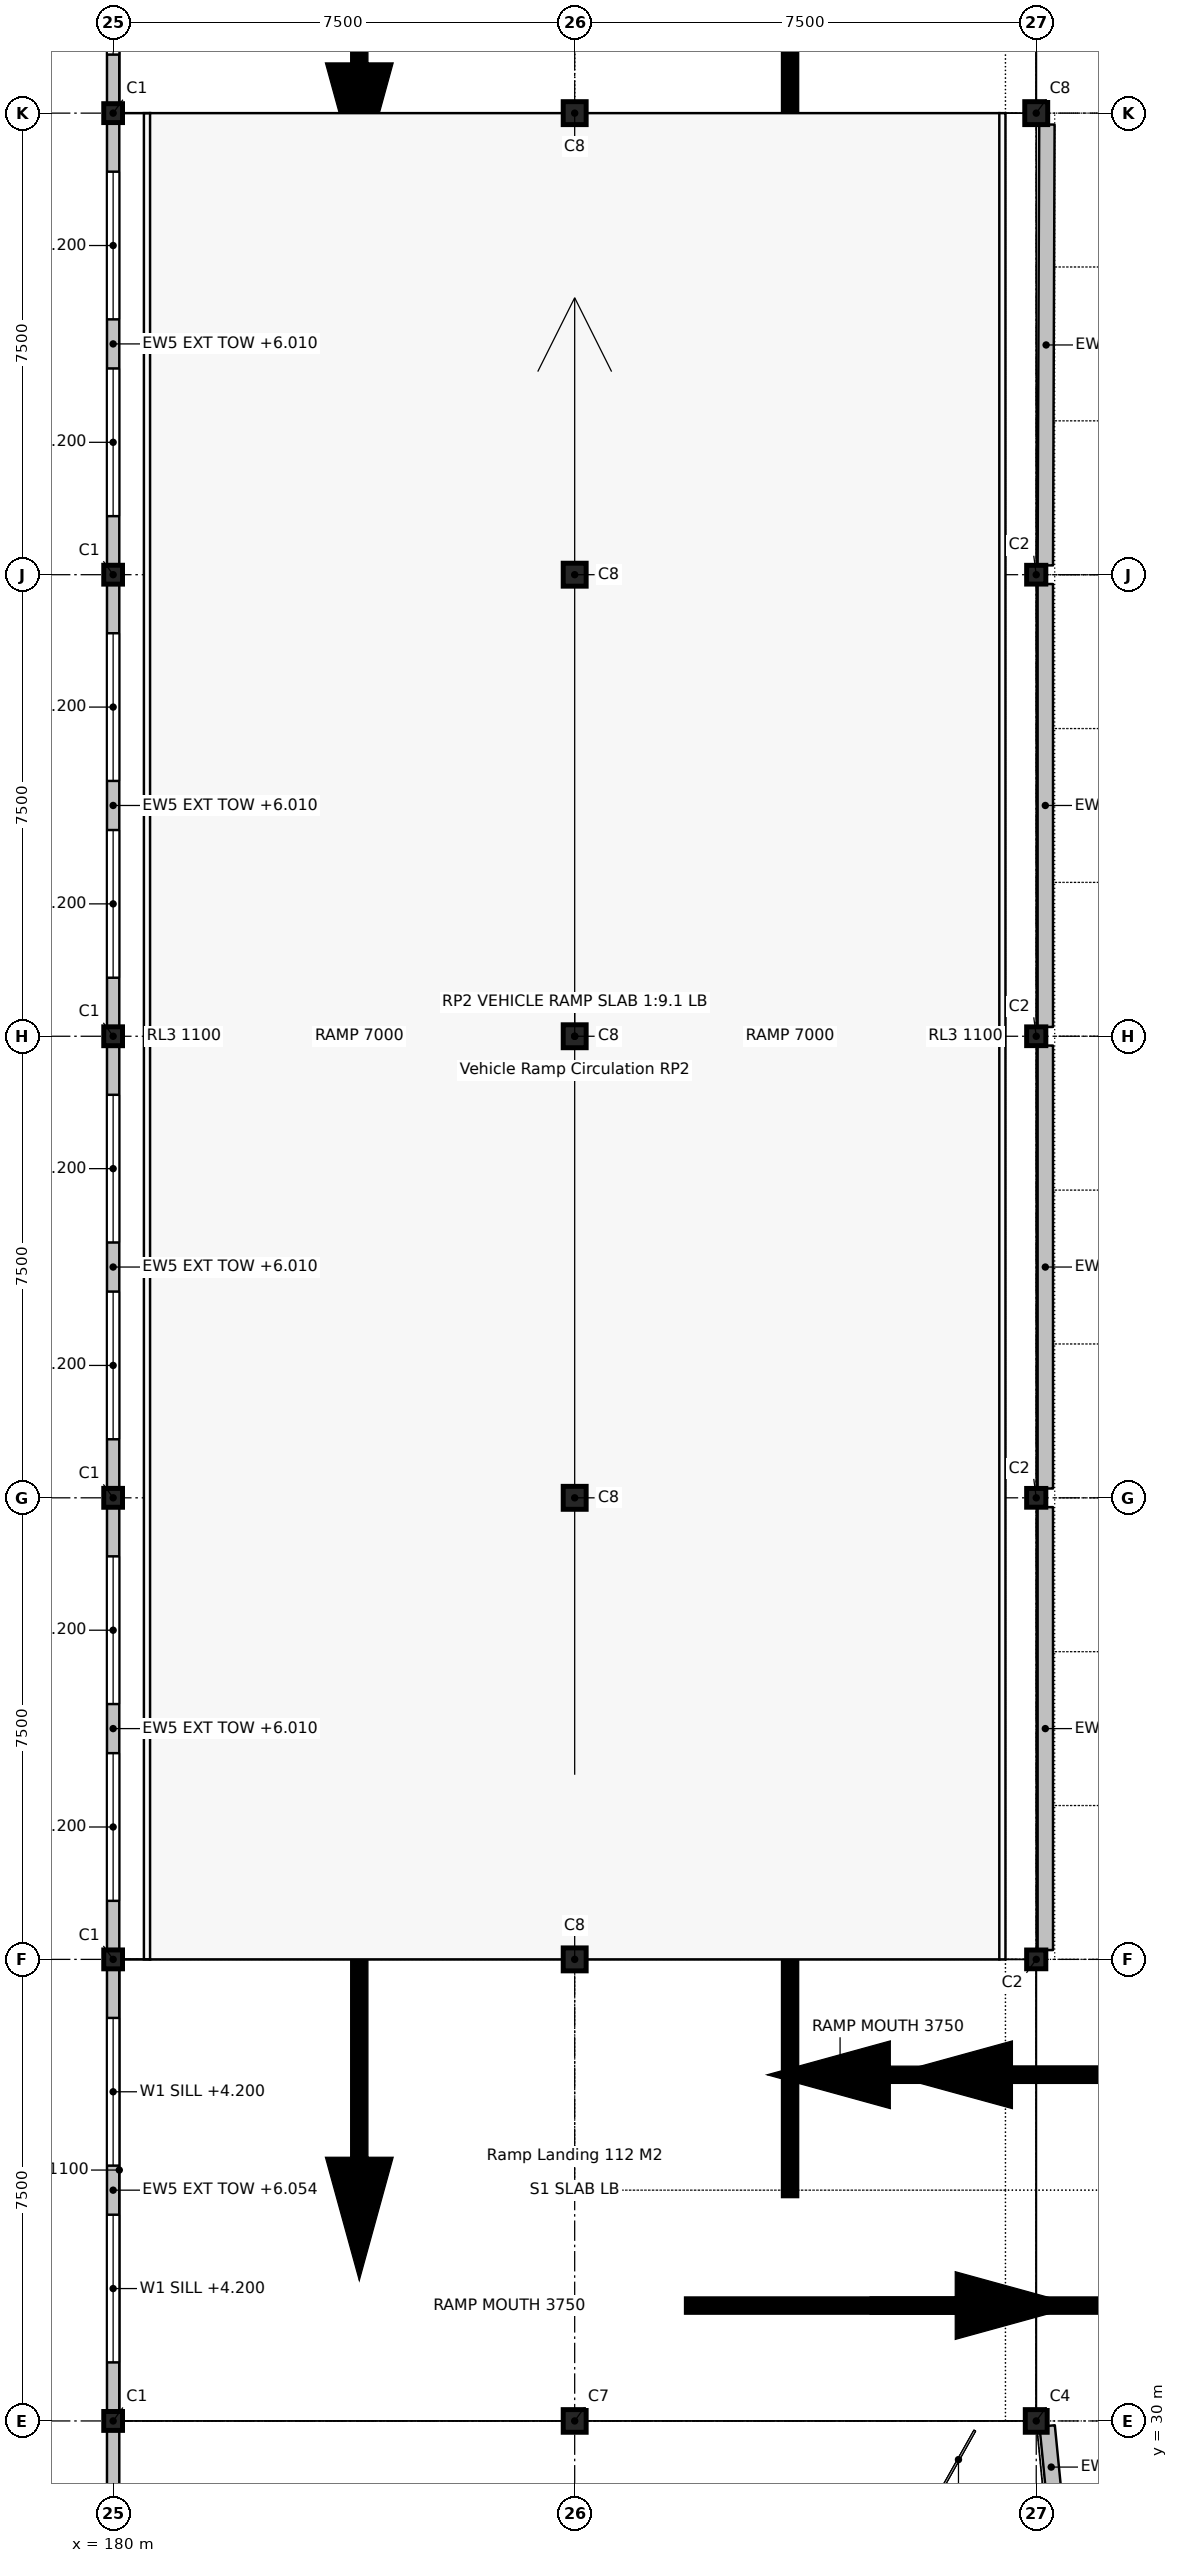
"""IFC4 building model, lengths in metres.
Left out: names, types, materials, properties, quantities, classifications, styles, units other than length and angle.
Written with IfcOpenShell. Run it as: python <this file> out.ifc"""

import sys

from ifc_helpers import new_model, si_unit, direction, frame, frame_2d, origin, origin_2d, place, context, subcontext, project, spatial, rectangle, i_section, extrude, element, fill, save


model = new_model("IFC4")
c1 = context("Model", 3, precision=1e-05, world=origin(), true_north=direction((0.0, 1.0)))
c2 = subcontext(c1, "Body", "Model", "MODEL_VIEW")
j1 = project(units=[si_unit("LENGTHUNIT", "METRE"), si_unit("PLANEANGLEUNIT", "RADIAN")], contexts=[c1])
p1 = place(None, origin())
s1 = spatial("IfcSite", under=j1, at=p1, CompositionType="ELEMENT")
p2 = place(p1, origin())
s2 = spatial("IfcBuilding", under=s1, at=p2, CompositionType="ELEMENT")
p3 = place(p2, frame((0.0, 0.0, 3.3)))
s3 = spatial("IfcBuildingStorey", under=s2, at=p3, CompositionType="ELEMENT", Elevation=3.3)
for number, where, z_axis, x_axis in (
    (1, (180.0, 30.0, 0.0), (0.0, 0.0, 1.0), (1.0, 0.0, 0.0)),
    (2, (180.0, 37.5, 0.0), (0.0, 0.0, 1.0), (1.0, 0.0, 0.0)),
    (3, (180.0, 45.0, 0.0), (0.0, 0.0, 1.0), (1.0, 0.0, 0.0)),
    (4, (180.0, 52.5, 0.0), (0.0, 0.0, 1.0), (1.0, 0.0, 0.0)),
    (5, (180.0, 60.0, 0.0), (0.0, 0.0, 1.0), (1.0, 0.0, 0.0)),
    (6, (180.0, 67.5, 0.0), (0.0, 0.0, 1.0), (1.0, 0.0, 0.0)),
):
    element("IfcColumn", number, at=place(p3, frame(where, z_axis=z_axis, x_axis=x_axis)), inside=s3, PredefinedType="COLUMN", context=c2, shape_type="SweptSolid", body=[
        extrude(i_section(OverallWidth=0.305, OverallDepth=0.307, WebThickness=0.01, FlangeThickness=0.015, FilletRadius=0.015, at=origin_2d()), origin(), (0.0, 0.0, 1.0), 3.3),
    ])
p4 = place(p3, frame((187.5, 30.0, 0.0), z_axis=(0.0, 0.0, 1.0), x_axis=(1.0, 0.0, 0.0)))
e7 = element("IfcColumn", 7, at=p4, inside=s3, PredefinedType="COLUMN", context=c2, shape_type="SweptSolid", body=[
    extrude(i_section(OverallWidth=0.373, OverallDepth=0.368, WebThickness=0.015, FlangeThickness=0.024, FilletRadius=0.015, at=origin_2d()), origin(), (0.0, 0.0, 1.0), 3.3),
])
for number, where, z_axis, x_axis in (
    (8, (187.5, 37.5, 0.0), (0.0, 0.0, 1.0), (1.0, 0.0, 0.0)),
    (9, (187.5, 45.0, 0.0), (0.0, 0.0, 1.0), (1.0, 0.0, 0.0)),
    (10, (187.5, 52.5, 0.0), (0.0, 0.0, 1.0), (1.0, 0.0, 0.0)),
    (11, (187.5, 60.0, 0.0), (0.0, 0.0, 1.0), (1.0, 0.0, 0.0)),
    (12, (187.5, 67.5, 0.0), (0.0, 0.0, 1.0), (1.0, 0.0, 0.0)),
    (13, (195.0, 67.5, 0.0), (0.0, 0.0, 1.0), (0.0, 1.0, 0.0)),
):
    element("IfcColumn", number, at=place(p3, frame(where, z_axis=z_axis, x_axis=x_axis)), inside=s3, PredefinedType="COLUMN", context=c2, shape_type="SweptSolid", body=[
        extrude(i_section(OverallWidth=0.373, OverallDepth=0.373, WebThickness=0.016, FlangeThickness=0.026, FilletRadius=0.015, at=origin_2d()), origin(), (0.0, 0.0, 1.0), 3.3),
    ])
for number, where, z_axis, x_axis in (
    (14, (195.0, 60.0, 0.0), (0.0, 0.0, 1.0), (0.0, 1.0, 0.0)),
    (15, (195.0, 52.5, 0.0), (0.0, 0.0, 1.0), (0.0, 1.0, 0.0)),
    (16, (195.0, 45.0, 0.0), (0.0, 0.0, 1.0), (0.0, 1.0, 0.0)),
    (17, (195.0, 37.5, 0.0), (0.0, 0.0, 1.0), (0.0, 1.0, 0.0)),
):
    element("IfcColumn", number, at=place(p3, frame(where, z_axis=z_axis, x_axis=x_axis)), inside=s3, PredefinedType="COLUMN", context=c2, shape_type="SweptSolid", body=[
        extrude(i_section(OverallWidth=0.305, OverallDepth=0.312, WebThickness=0.011, FlangeThickness=0.017, FilletRadius=0.015, at=origin_2d()), origin(), (0.0, 0.0, 1.0), 3.3),
    ])
p5 = place(p3, frame((195.0, 30.0, 0.0), z_axis=(0.0, 0.0, 1.0), x_axis=(0.0, 1.0, 0.0)))
e18 = element("IfcColumn", 18, at=p5, inside=s3, PredefinedType="COLUMN", context=c2, shape_type="SweptSolid", body=[
    extrude(i_section(OverallWidth=0.368, OverallDepth=0.356, WebThickness=0.011, FlangeThickness=0.018, FilletRadius=0.015, at=origin_2d()), origin(), (0.0, 0.0, 1.0), 3.3),
])
p6 = place(p3, frame((195.173, 67.314, 0.0), z_axis=(0.0, 0.0, 1.0), x_axis=(-0.003612914829, -0.999993473402, 0.0)))
e19 = element("IfcWall", 19, at=p6, inside=s3, PredefinedType="SOLIDWALL", context=c2, shape_type="SweptSolid", body=[
    extrude(rectangle(XDim=7.163, YDim=0.25, at=frame_2d((3.582, 0.0))), origin(), (0.0, 0.0, 1.0), 1.1),
])
for number, where, z_axis, x_axis in (
    (20, (195.147, 59.848, 0.0), (0.0, 0.0, 1.0), (0.0, -1.0, 0.0)),
    (21, (195.147, 52.348, 0.0), (0.0, 0.0, 1.0), (0.0, -1.0, 0.0)),
    (22, (195.147, 44.848, 0.0), (0.0, 0.0, 1.0), (0.0, -1.0, 0.0)),
):
    element("IfcWall", number, at=place(p3, frame(where, z_axis=z_axis, x_axis=x_axis)), inside=s3, PredefinedType="SOLIDWALL", context=c2, shape_type="SweptSolid", body=[
        extrude(rectangle(XDim=7.197, YDim=0.25, at=frame_2d((3.598, 0.0))), origin(), (0.0, 0.0, 1.0), 1.1),
    ])
p7 = place(p3, frame((195.178, 29.918, 0.0), z_axis=(0.0, 0.0, 1.0), x_axis=(0.097900088064, -0.995196248364, 0.0)))
e23 = element("IfcWall", 23, at=p7, inside=s3, PredefinedType="SOLIDWALL", context=c2, shape_type="SweptSolid", body=[
    extrude(rectangle(XDim=1.342, YDim=0.25, at=frame_2d((0.671, 0.0))), origin(), (0.0, 0.0, 1.0), 1.1),
])
p8 = place(p3, frame((180.0, 22.654, 0.0), z_axis=(0.0, 0.0, 1.0), x_axis=(0.0, 1.0, 0.0)))
e24 = element("IfcWall", 24, at=p8, inside=s3, PredefinedType="SOLIDWALL", context=c2, shape_type="SweptSolid", body=[
    extrude(rectangle(XDim=7.193, YDim=0.2, at=frame_2d((3.596, 0.0))), origin(), (0.0, 0.0, 1.0), 2.71),
])
p9 = place(p8, frame((1.098, 0.0, 1.1)))
e25 = element("IfcOpeningElement", 25, at=p9, cuts=e24, PredefinedType="OPENING", context=c2, shape_type="SweptSolid", body=[
    extrude(rectangle(XDim=1.8, YDim=1.4, at=frame_2d((0.9, 0.7))), frame((0.0, 0.11, 0.0), z_axis=(0.0, -1.0, 0.0), x_axis=(1.0, 0.0, 0.0)), (0.0, 0.0, 1.0), 0.22),
])
p10 = place(p8, frame((4.295, 0.0, 1.1)))
e26 = element("IfcOpeningElement", 26, at=p10, cuts=e24, PredefinedType="OPENING", context=c2, shape_type="SweptSolid", body=[
    extrude(rectangle(XDim=1.8, YDim=1.4, at=frame_2d((0.9, 0.7))), frame((0.0, 0.11, 0.0), z_axis=(0.0, -1.0, 0.0), x_axis=(1.0, 0.0, 0.0)), (0.0, 0.0, 1.0), 0.22),
])
p11 = place(p3, frame((180.0, 30.154, 0.0), z_axis=(0.0, 0.0, 1.0), x_axis=(0.0, 1.0, 0.0)))
e27 = element("IfcWall", 27, at=p11, inside=s3, PredefinedType="SOLIDWALL", context=c2, shape_type="SweptSolid", body=[
    extrude(rectangle(XDim=7.193, YDim=0.2, at=frame_2d((3.596, 0.0))), origin(), (0.0, 0.0, 1.0), 2.754),
])
p12 = place(p11, frame((0.798, 0.0, 0.9)))
e28 = element("IfcOpeningElement", 28, at=p12, cuts=e27, PredefinedType="OPENING", context=c2, shape_type="SweptSolid", body=[
    extrude(rectangle(XDim=2.4, YDim=1.5, at=frame_2d((1.2, 0.75))), frame((0.0, 0.11, 0.0), z_axis=(0.0, -1.0, 0.0), x_axis=(1.0, 0.0, 0.0)), (0.0, 0.0, 1.0), 0.22),
])
p13 = place(p11, frame((3.995, 0.0, 0.9)))
e29 = element("IfcOpeningElement", 29, at=p13, cuts=e27, PredefinedType="OPENING", context=c2, shape_type="SweptSolid", body=[
    extrude(rectangle(XDim=2.4, YDim=1.5, at=frame_2d((1.2, 0.75))), frame((0.0, 0.11, 0.0), z_axis=(0.0, -1.0, 0.0), x_axis=(1.0, 0.0, 0.0)), (0.0, 0.0, 1.0), 0.22),
])
p14 = place(p3, frame((180.0, 37.654, 0.0), z_axis=(0.0, 0.0, 1.0), x_axis=(0.0, 1.0, 0.0)))
e30 = element("IfcWall", 30, at=p14, inside=s3, PredefinedType="SOLIDWALL", context=c2, shape_type="SweptSolid", body=[
    extrude(rectangle(XDim=7.193, YDim=0.2, at=frame_2d((3.596, 0.0))), origin(), (0.0, 0.0, 1.0), 2.71),
])
p15 = place(p14, frame((0.798, 0.0, 0.9)))
e31 = element("IfcOpeningElement", 31, at=p15, cuts=e30, PredefinedType="OPENING", context=c2, shape_type="SweptSolid", body=[
    extrude(rectangle(XDim=2.4, YDim=1.5, at=frame_2d((1.2, 0.75))), frame((0.0, 0.11, 0.0), z_axis=(0.0, -1.0, 0.0), x_axis=(1.0, 0.0, 0.0)), (0.0, 0.0, 1.0), 0.22),
])
p16 = place(p14, frame((3.995, 0.0, 0.9)))
e32 = element("IfcOpeningElement", 32, at=p16, cuts=e30, PredefinedType="OPENING", context=c2, shape_type="SweptSolid", body=[
    extrude(rectangle(XDim=2.4, YDim=1.5, at=frame_2d((1.2, 0.75))), frame((0.0, 0.11, 0.0), z_axis=(0.0, -1.0, 0.0), x_axis=(1.0, 0.0, 0.0)), (0.0, 0.0, 1.0), 0.22),
])
p17 = place(p3, frame((180.0, 45.154, 0.0), z_axis=(0.0, 0.0, 1.0), x_axis=(0.0, 1.0, 0.0)))
e33 = element("IfcWall", 33, at=p17, inside=s3, PredefinedType="SOLIDWALL", context=c2, shape_type="SweptSolid", body=[
    extrude(rectangle(XDim=7.193, YDim=0.2, at=frame_2d((3.596, 0.0))), origin(), (0.0, 0.0, 1.0), 2.71),
])
p18 = place(p17, frame((0.798, 0.0, 0.9)))
e34 = element("IfcOpeningElement", 34, at=p18, cuts=e33, PredefinedType="OPENING", context=c2, shape_type="SweptSolid", body=[
    extrude(rectangle(XDim=2.4, YDim=1.5, at=frame_2d((1.2, 0.75))), frame((0.0, 0.11, 0.0), z_axis=(0.0, -1.0, 0.0), x_axis=(1.0, 0.0, 0.0)), (0.0, 0.0, 1.0), 0.22),
])
p19 = place(p17, frame((3.995, 0.0, 0.9)))
e35 = element("IfcOpeningElement", 35, at=p19, cuts=e33, PredefinedType="OPENING", context=c2, shape_type="SweptSolid", body=[
    extrude(rectangle(XDim=2.4, YDim=1.5, at=frame_2d((1.2, 0.75))), frame((0.0, 0.11, 0.0), z_axis=(0.0, -1.0, 0.0), x_axis=(1.0, 0.0, 0.0)), (0.0, 0.0, 1.0), 0.22),
])
p20 = place(p3, frame((180.0, 52.654, 0.0), z_axis=(0.0, 0.0, 1.0), x_axis=(0.0, 1.0, 0.0)))
e36 = element("IfcWall", 36, at=p20, inside=s3, PredefinedType="SOLIDWALL", context=c2, shape_type="SweptSolid", body=[
    extrude(rectangle(XDim=7.193, YDim=0.2, at=frame_2d((3.596, 0.0))), origin(), (0.0, 0.0, 1.0), 2.71),
])
p21 = place(p20, frame((0.798, 0.0, 0.9)))
e37 = element("IfcOpeningElement", 37, at=p21, cuts=e36, PredefinedType="OPENING", context=c2, shape_type="SweptSolid", body=[
    extrude(rectangle(XDim=2.4, YDim=1.5, at=frame_2d((1.2, 0.75))), frame((0.0, 0.11, 0.0), z_axis=(0.0, -1.0, 0.0), x_axis=(1.0, 0.0, 0.0)), (0.0, 0.0, 1.0), 0.22),
])
p22 = place(p20, frame((3.995, 0.0, 0.9)))
e38 = element("IfcOpeningElement", 38, at=p22, cuts=e36, PredefinedType="OPENING", context=c2, shape_type="SweptSolid", body=[
    extrude(rectangle(XDim=2.4, YDim=1.5, at=frame_2d((1.2, 0.75))), frame((0.0, 0.11, 0.0), z_axis=(0.0, -1.0, 0.0), x_axis=(1.0, 0.0, 0.0)), (0.0, 0.0, 1.0), 0.22),
])
p23 = place(p3, frame((180.0, 60.154, 0.0), z_axis=(0.0, 0.0, 1.0), x_axis=(0.0, 1.0, 0.0)))
e39 = element("IfcWall", 39, at=p23, inside=s3, PredefinedType="SOLIDWALL", context=c2, shape_type="SweptSolid", body=[
    extrude(rectangle(XDim=7.193, YDim=0.2, at=frame_2d((3.596, 0.0))), origin(), (0.0, 0.0, 1.0), 2.71),
])
p24 = place(p23, frame((0.798, 0.0, 0.9)))
e40 = element("IfcOpeningElement", 40, at=p24, cuts=e39, PredefinedType="OPENING", context=c2, shape_type="SweptSolid", body=[
    extrude(rectangle(XDim=2.4, YDim=1.5, at=frame_2d((1.2, 0.75))), frame((0.0, 0.11, 0.0), z_axis=(0.0, -1.0, 0.0), x_axis=(1.0, 0.0, 0.0)), (0.0, 0.0, 1.0), 0.22),
])
p25 = place(p23, frame((3.995, 0.0, 0.9)))
e41 = element("IfcOpeningElement", 41, at=p25, cuts=e39, PredefinedType="OPENING", context=c2, shape_type="SweptSolid", body=[
    extrude(rectangle(XDim=2.4, YDim=1.5, at=frame_2d((1.2, 0.75))), frame((0.0, 0.11, 0.0), z_axis=(0.0, -1.0, 0.0), x_axis=(1.0, 0.0, 0.0)), (0.0, 0.0, 1.0), 0.22),
])
p26 = place(p3, frame((180.0, 67.654, 0.0), z_axis=(0.0, 0.0, 1.0), x_axis=(0.0, 1.0, 0.0)))
e42 = element("IfcWall", 42, at=p26, inside=s3, PredefinedType="SOLIDWALL", context=c2, shape_type="SweptSolid", body=[
    extrude(rectangle(XDim=7.193, YDim=0.2, at=frame_2d((3.596, 0.0))), origin(), (0.0, 0.0, 1.0), 2.754),
])
p27 = place(p26, frame((0.798, 0.0, 0.9)))
e43 = element("IfcOpeningElement", 43, at=p27, cuts=e42, PredefinedType="OPENING", context=c2, shape_type="SweptSolid", body=[
    extrude(rectangle(XDim=2.4, YDim=1.5, at=frame_2d((1.2, 0.75))), frame((0.0, 0.11, 0.0), z_axis=(0.0, -1.0, 0.0), x_axis=(1.0, 0.0, 0.0)), (0.0, 0.0, 1.0), 0.22),
])
p28 = place(p26, frame((3.995, 0.0, 0.9)))
e44 = element("IfcOpeningElement", 44, at=p28, cuts=e42, PredefinedType="OPENING", context=c2, shape_type="SweptSolid", body=[
    extrude(rectangle(XDim=2.4, YDim=1.5, at=frame_2d((1.2, 0.75))), frame((0.0, 0.11, 0.0), z_axis=(0.0, -1.0, 0.0), x_axis=(1.0, 0.0, 0.0)), (0.0, 0.0, 1.0), 0.22),
])
p29 = place(p12, origin())
e45 = element("IfcWindow", 45, at=p29, inside=s3, PartitioningType="DOUBLE_PANEL_VERTICAL", PredefinedType="WINDOW", context=c2, shape_type="SweptSolid", body=[
    extrude(rectangle(XDim=2.4, YDim=1.5, at=frame_2d((1.2, 0.75))), frame((0.0, 0.03, 0.0), z_axis=(0.0, -1.0, 0.0), x_axis=(1.0, 0.0, 0.0)), (0.0, 0.0, 1.0), 0.06),
])
fill(e28, e45)
p30 = place(p13, origin())
e46 = element("IfcWindow", 46, at=p30, inside=s3, PartitioningType="DOUBLE_PANEL_VERTICAL", PredefinedType="WINDOW", context=c2, shape_type="SweptSolid", body=[
    extrude(rectangle(XDim=2.4, YDim=1.5, at=frame_2d((1.2, 0.75))), frame((0.0, 0.03, 0.0), z_axis=(0.0, -1.0, 0.0), x_axis=(1.0, 0.0, 0.0)), (0.0, 0.0, 1.0), 0.06),
])
fill(e29, e46)
p31 = place(p15, origin())
e47 = element("IfcWindow", 47, at=p31, inside=s3, PartitioningType="DOUBLE_PANEL_VERTICAL", PredefinedType="WINDOW", context=c2, shape_type="SweptSolid", body=[
    extrude(rectangle(XDim=2.4, YDim=1.5, at=frame_2d((1.2, 0.75))), frame((0.0, 0.03, 0.0), z_axis=(0.0, -1.0, 0.0), x_axis=(1.0, 0.0, 0.0)), (0.0, 0.0, 1.0), 0.06),
])
fill(e31, e47)
p32 = place(p16, origin())
e48 = element("IfcWindow", 48, at=p32, inside=s3, PartitioningType="DOUBLE_PANEL_VERTICAL", PredefinedType="WINDOW", context=c2, shape_type="SweptSolid", body=[
    extrude(rectangle(XDim=2.4, YDim=1.5, at=frame_2d((1.2, 0.75))), frame((0.0, 0.03, 0.0), z_axis=(0.0, -1.0, 0.0), x_axis=(1.0, 0.0, 0.0)), (0.0, 0.0, 1.0), 0.06),
])
fill(e32, e48)
p33 = place(p18, origin())
e49 = element("IfcWindow", 49, at=p33, inside=s3, PartitioningType="DOUBLE_PANEL_VERTICAL", PredefinedType="WINDOW", context=c2, shape_type="SweptSolid", body=[
    extrude(rectangle(XDim=2.4, YDim=1.5, at=frame_2d((1.2, 0.75))), frame((0.0, 0.03, 0.0), z_axis=(0.0, -1.0, 0.0), x_axis=(1.0, 0.0, 0.0)), (0.0, 0.0, 1.0), 0.06),
])
fill(e34, e49)
p34 = place(p19, origin())
e50 = element("IfcWindow", 50, at=p34, inside=s3, PartitioningType="DOUBLE_PANEL_VERTICAL", PredefinedType="WINDOW", context=c2, shape_type="SweptSolid", body=[
    extrude(rectangle(XDim=2.4, YDim=1.5, at=frame_2d((1.2, 0.75))), frame((0.0, 0.03, 0.0), z_axis=(0.0, -1.0, 0.0), x_axis=(1.0, 0.0, 0.0)), (0.0, 0.0, 1.0), 0.06),
])
fill(e35, e50)
p35 = place(p21, origin())
e51 = element("IfcWindow", 51, at=p35, inside=s3, PartitioningType="DOUBLE_PANEL_VERTICAL", PredefinedType="WINDOW", context=c2, shape_type="SweptSolid", body=[
    extrude(rectangle(XDim=2.4, YDim=1.5, at=frame_2d((1.2, 0.75))), frame((0.0, 0.03, 0.0), z_axis=(0.0, -1.0, 0.0), x_axis=(1.0, 0.0, 0.0)), (0.0, 0.0, 1.0), 0.06),
])
fill(e37, e51)
p36 = place(p22, origin())
e52 = element("IfcWindow", 52, at=p36, inside=s3, PartitioningType="DOUBLE_PANEL_VERTICAL", PredefinedType="WINDOW", context=c2, shape_type="SweptSolid", body=[
    extrude(rectangle(XDim=2.4, YDim=1.5, at=frame_2d((1.2, 0.75))), frame((0.0, 0.03, 0.0), z_axis=(0.0, -1.0, 0.0), x_axis=(1.0, 0.0, 0.0)), (0.0, 0.0, 1.0), 0.06),
])
fill(e38, e52)
p37 = place(p24, origin())
e53 = element("IfcWindow", 53, at=p37, inside=s3, PartitioningType="DOUBLE_PANEL_VERTICAL", PredefinedType="WINDOW", context=c2, shape_type="SweptSolid", body=[
    extrude(rectangle(XDim=2.4, YDim=1.5, at=frame_2d((1.2, 0.75))), frame((0.0, 0.03, 0.0), z_axis=(0.0, -1.0, 0.0), x_axis=(1.0, 0.0, 0.0)), (0.0, 0.0, 1.0), 0.06),
])
fill(e40, e53)
p38 = place(p25, origin())
e54 = element("IfcWindow", 54, at=p38, inside=s3, PartitioningType="DOUBLE_PANEL_VERTICAL", PredefinedType="WINDOW", context=c2, shape_type="SweptSolid", body=[
    extrude(rectangle(XDim=2.4, YDim=1.5, at=frame_2d((1.2, 0.75))), frame((0.0, 0.03, 0.0), z_axis=(0.0, -1.0, 0.0), x_axis=(1.0, 0.0, 0.0)), (0.0, 0.0, 1.0), 0.06),
])
fill(e41, e54)
p39 = place(p27, origin())
e55 = element("IfcWindow", 55, at=p39, inside=s3, PartitioningType="DOUBLE_PANEL_VERTICAL", PredefinedType="WINDOW", context=c2, shape_type="SweptSolid", body=[
    extrude(rectangle(XDim=2.4, YDim=1.5, at=frame_2d((1.2, 0.75))), frame((0.0, 0.03, 0.0), z_axis=(0.0, -1.0, 0.0), x_axis=(1.0, 0.0, 0.0)), (0.0, 0.0, 1.0), 0.06),
])
fill(e43, e55)
save(model, sys.argv[1])
